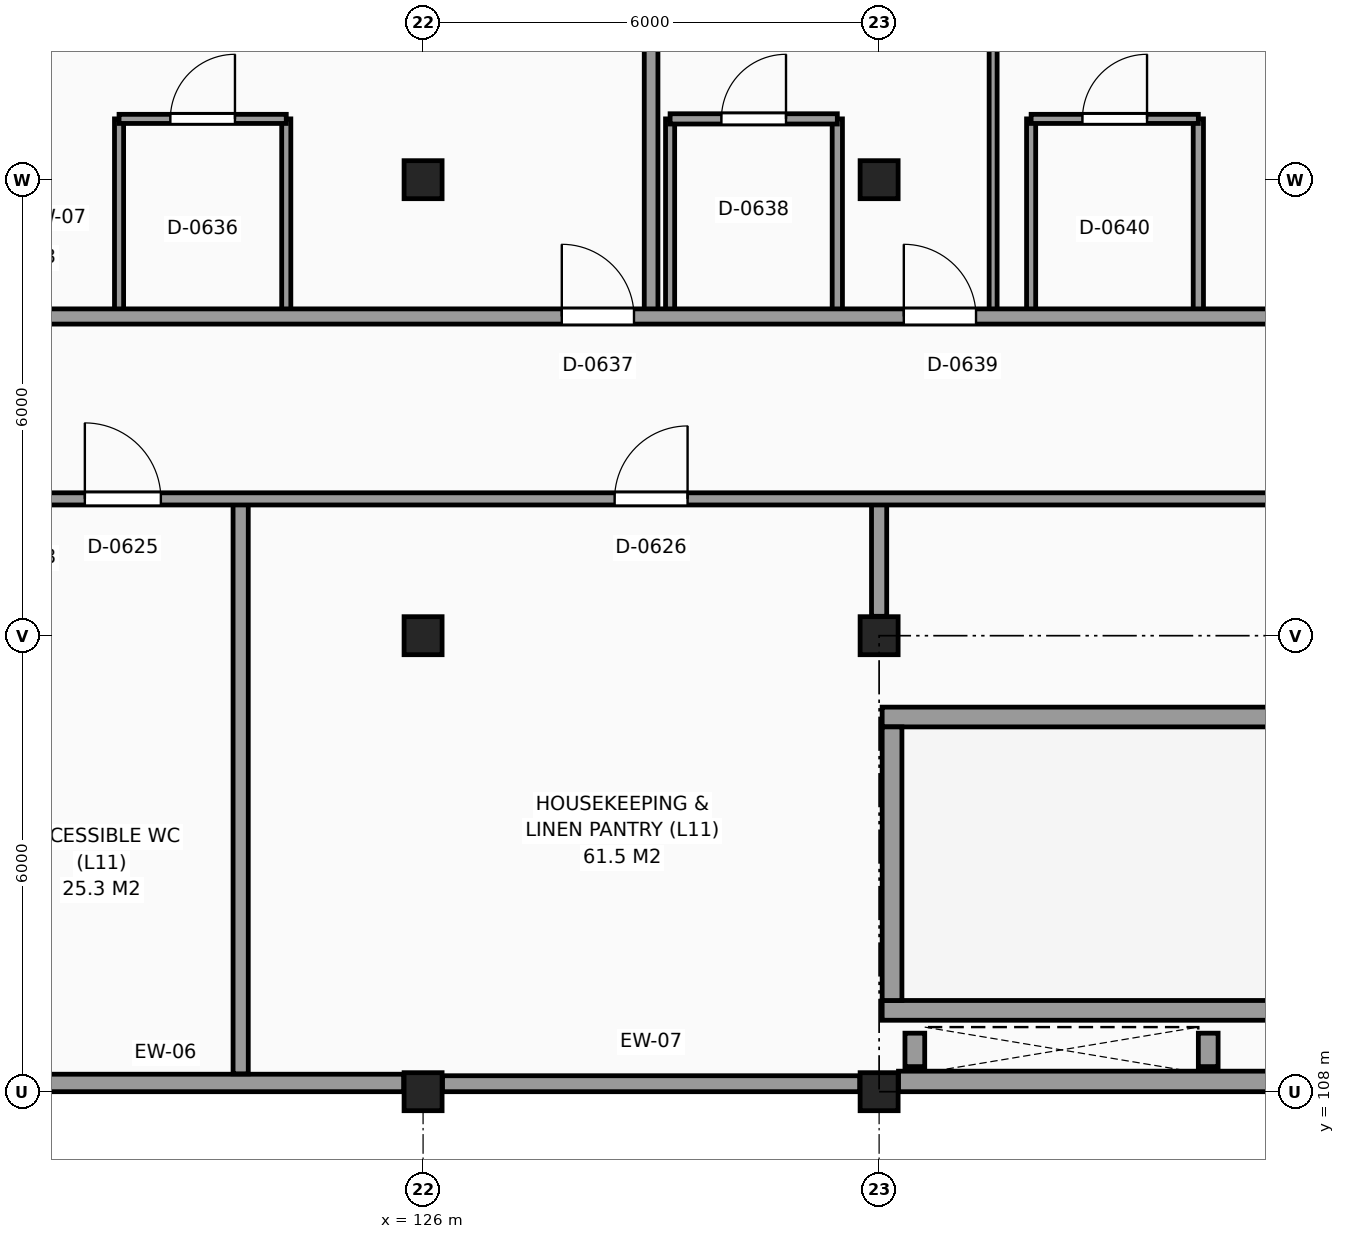
"""IFC4 building model, lengths in metres.
Left out: names, types, materials, properties, quantities, classifications, styles, units other than length and angle.
Written with IfcOpenShell. Run it as: python <this file> out.ifc"""

import sys

from ifc_helpers import new_model, si_unit, direction, frame, frame_2d, origin, origin_2d, place, context, subcontext, project, spatial, rectangle, extrude, element, fill, save


model = new_model("IFC4")
c1 = context("Model", 3, precision=1e-05, world=origin(), true_north=direction((0.0, 1.0)))
c2 = subcontext(c1, "Body", "Model", "MODEL_VIEW")
j1 = project(units=[si_unit("LENGTHUNIT", "METRE"), si_unit("PLANEANGLEUNIT", "RADIAN")], contexts=[c1])
p1 = place(None, origin())
s1 = spatial("IfcSite", under=j1, at=p1, CompositionType="ELEMENT")
p2 = place(p1, origin())
s2 = spatial("IfcBuilding", under=s1, at=p2, CompositionType="ELEMENT")
p3 = place(p2, frame((0.0, 0.0, 44.7)))
s3 = spatial("IfcBuildingStorey", under=s2, at=p3, CompositionType="ELEMENT", Elevation=44.7)
for number, where, z_axis, x_axis in (
    (1, (126.0, 108.0, 0.0), (0.0, 0.0, 1.0), (1.0, 0.0, 0.0)),
    (2, (126.0, 114.0, 0.0), (0.0, 0.0, 1.0), (1.0, 0.0, 0.0)),
    (3, (126.0, 120.0, 0.0), (0.0, 0.0, 1.0), (1.0, 0.0, 0.0)),
    (4, (132.0, 108.0, 0.0), (0.0, 0.0, 1.0), (1.0, 0.0, 0.0)),
    (5, (132.0, 114.0, 0.0), (0.0, 0.0, 1.0), (1.0, 0.0, 0.0)),
    (6, (132.0, 120.0, 0.0), (0.0, 0.0, 1.0), (1.0, 0.0, 0.0)),
):
    element("IfcColumn", number, at=place(p3, frame(where, z_axis=z_axis, x_axis=x_axis)), inside=s3, PredefinedType="COLUMN", context=c2, shape_type="SweptSolid", body=[
        extrude(rectangle(XDim=0.5, YDim=0.5, at=origin_2d()), origin(), (0.0, 0.0, 1.0), 3.3),
    ])
p4 = place(p3, frame((120.255, 108.115, 0.0), z_axis=(0.0, 0.0, 1.0), x_axis=(1.0, 0.0, 0.0)))
e7 = element("IfcWall", 7, at=p4, inside=s3, PredefinedType="SOLIDWALL", context=c2, shape_type="SweptSolid", body=[
    extrude(rectangle(XDim=5.49, YDim=0.23, at=frame_2d((2.745, 0.0))), origin(), (0.0, 0.0, 1.0), 2.4),
])
p5 = place(p3, frame((126.255, 108.105, 0.0), z_axis=(0.0, 0.0, 1.0), x_axis=(1.0, 0.0, 0.0)))
e8 = element("IfcWall", 8, at=p5, inside=s3, PredefinedType="SOLIDWALL", context=c2, shape_type="SweptSolid", body=[
    extrude(rectangle(XDim=5.49, YDim=0.21, at=frame_2d((2.745, 0.0))), origin(), (0.0, 0.0, 1.0), 2.4),
])
p6 = place(p3, frame((132.255, 108.135, 0.0), z_axis=(0.0, 0.0, 1.0), x_axis=(1.0, 0.0, 0.0)))
e9 = element("IfcWall", 9, at=p6, inside=s3, PredefinedType="SOLIDWALL", context=c2, shape_type="SweptSolid", body=[
    extrude(rectangle(XDim=5.49, YDim=0.27, at=frame_2d((2.745, 0.0))), origin(), (0.0, 0.0, 1.0), 3.05),
])
for number, where, z_axis, x_axis in (
    (10, (132.04, 109.07, 0.0), (0.0, 0.0, 1.0), (1.0, 0.0, 0.0)),
    (11, (132.04, 112.93, 0.0), (0.0, 0.0, 1.0), (1.0, 0.0, 0.0)),
):
    element("IfcWall", number, at=place(p3, frame(where, z_axis=z_axis, x_axis=x_axis)), inside=s3, PredefinedType="SHEAR", context=c2, shape_type="SweptSolid", body=[
        extrude(rectangle(XDim=10.72, YDim=0.26, at=frame_2d((5.36, 0.0))), origin(), (0.0, 0.0, 1.0), 3.3),
    ])
p7 = place(p3, frame((132.17, 109.2, 0.0), z_axis=(0.0, 0.0, 1.0), x_axis=(0.0, 1.0, 0.0)))
e12 = element("IfcWall", 12, at=p7, inside=s3, PredefinedType="SHEAR", context=c2, shape_type="SweptSolid", body=[
    extrude(rectangle(XDim=3.6, YDim=0.26, at=frame_2d((1.8, 0.0))), origin(), (0.0, 0.0, 1.0), 3.3),
])
for number, where, z_axis, x_axis in (
    (13, (132.47, 108.33, 0.0), (0.0, 0.0, 1.0), (0.0, 1.0, 0.0)),
    (14, (136.33, 108.33, 0.0), (0.0, 0.0, 1.0), (0.0, 1.0, 0.0)),
):
    element("IfcWall", number, at=place(p3, frame(where, z_axis=z_axis, x_axis=x_axis)), inside=s3, PredefinedType="SHEAR", context=c2, shape_type="SweptSolid", body=[
        extrude(rectangle(XDim=0.44, YDim=0.26, at=frame_2d((0.22, 0.0))), origin(), (0.0, 0.0, 1.0), 3.3),
    ])
p8 = place(p3, frame((122.0, 118.2, 0.0), z_axis=(0.0, 0.0, 1.0), x_axis=(0.0, 1.0, 0.0)))
e15 = element("IfcWall", 15, at=p8, inside=s3, PredefinedType="PARTITIONING", context=c2, shape_type="SweptSolid", body=[
    extrude(rectangle(XDim=2.6, YDim=0.12, at=frame_2d((1.3, 0.0))), origin(), (0.0, 0.0, 1.0), 3.05),
])
p9 = place(p3, frame((123.6, 108.235, 0.0), z_axis=(0.0, 0.0, 1.0), x_axis=(0.0, 1.0, 0.0)))
e16 = element("IfcWall", 16, at=p9, inside=s3, PredefinedType="PARTITIONING", context=c2, shape_type="SweptSolid", body=[
    extrude(rectangle(XDim=7.565, YDim=0.2, at=frame_2d((3.782, 0.0))), origin(), (0.0, 0.0, 1.0), 3.05),
])
p10 = place(p3, frame((124.2, 118.2, 0.0), z_axis=(0.0, 0.0, 1.0), x_axis=(0.0, 1.0, 0.0)))
e17 = element("IfcWall", 17, at=p10, inside=s3, PredefinedType="PARTITIONING", context=c2, shape_type="SweptSolid", body=[
    extrude(rectangle(XDim=2.6, YDim=0.12, at=frame_2d((1.3, 0.0))), origin(), (0.0, 0.0, 1.0), 3.05),
])
p11 = place(p3, frame((129.0, 118.2, 0.0), z_axis=(0.0, 0.0, 1.0), x_axis=(0.0, 1.0, 0.0)))
e18 = element("IfcWall", 18, at=p11, inside=s3, PredefinedType="PARTITIONING", context=c2, shape_type="SweptSolid", body=[
    extrude(rectangle(XDim=7.585, YDim=0.18, at=frame_2d((3.792, 0.0))), origin(), (0.0, 0.0, 1.0), 3.05),
])
p12 = place(p3, frame((129.25, 118.2, 0.0), z_axis=(0.0, 0.0, 1.0), x_axis=(0.0, 1.0, 0.0)))
e19 = element("IfcWall", 19, at=p12, inside=s3, PredefinedType="PARTITIONING", context=c2, shape_type="SweptSolid", body=[
    extrude(rectangle(XDim=2.6, YDim=0.12, at=frame_2d((1.3, 0.0))), origin(), (0.0, 0.0, 1.0), 3.05),
])
p13 = place(p3, frame((131.45, 118.2, 0.0), z_axis=(0.0, 0.0, 1.0), x_axis=(0.0, 1.0, 0.0)))
e20 = element("IfcWall", 20, at=p13, inside=s3, PredefinedType="PARTITIONING", context=c2, shape_type="SweptSolid", body=[
    extrude(rectangle(XDim=2.6, YDim=0.135, at=frame_2d((1.3, 0.0))), origin(), (0.0, 0.0, 1.0), 3.05),
])
p14 = place(p3, frame((132.0, 114.255, 0.0), z_axis=(0.0, 0.0, 1.0), x_axis=(0.0, 1.0, 0.0)))
e21 = element("IfcWall", 21, at=p14, inside=s3, PredefinedType="PARTITIONING", context=c2, shape_type="SweptSolid", body=[
    extrude(rectangle(XDim=1.545, YDim=0.2, at=frame_2d((0.772, 0.0))), origin(), (0.0, 0.0, 1.0), 2.25),
])
p15 = place(p3, frame((133.5, 118.2, 0.0), z_axis=(0.0, 0.0, 1.0), x_axis=(0.0, 1.0, 0.0)))
e22 = element("IfcWall", 22, at=p15, inside=s3, PredefinedType="PARTITIONING", context=c2, shape_type="SweptSolid", body=[
    extrude(rectangle(XDim=7.565, YDim=0.105, at=frame_2d((3.782, 0.0))), origin(), (0.0, 0.0, 1.0), 3.05),
])
p16 = place(p3, frame((134.0, 118.2, 0.0), z_axis=(0.0, 0.0, 1.0), x_axis=(0.0, 1.0, 0.0)))
e23 = element("IfcWall", 23, at=p16, inside=s3, PredefinedType="PARTITIONING", context=c2, shape_type="SweptSolid", body=[
    extrude(rectangle(XDim=2.6, YDim=0.12, at=frame_2d((1.3, 0.0))), origin(), (0.0, 0.0, 1.0), 3.05),
])
p17 = place(p3, frame((136.2, 118.2, 0.0), z_axis=(0.0, 0.0, 1.0), x_axis=(0.0, 1.0, 0.0)))
e24 = element("IfcWall", 24, at=p17, inside=s3, PredefinedType="PARTITIONING", context=c2, shape_type="SweptSolid", body=[
    extrude(rectangle(XDim=2.6, YDim=0.135, at=frame_2d((1.3, 0.0))), origin(), (0.0, 0.0, 1.0), 3.05),
])
p18 = place(p3, frame((102.255, 115.8, 0.0), z_axis=(0.0, 0.0, 1.0), x_axis=(1.0, 0.0, 0.0)))
e25 = element("IfcWall", 25, at=p18, inside=s3, PredefinedType="PARTITIONING", context=c2, shape_type="SweptSolid", body=[
    extrude(rectangle(XDim=67.545, YDim=0.16, at=frame_2d((33.772, 0.0))), origin(), (0.0, 0.0, 1.0), 3.05),
])
p19 = place(p18, frame((44.145, 0.0, 0.0)))
e26 = element("IfcOpeningElement", 26, at=p19, cuts=e25, PredefinedType="OPENING", context=c2, shape_type="SweptSolid", body=[
    extrude(rectangle(XDim=1.2, YDim=2.2, at=frame_2d((0.6, 1.1))), frame((0.0, 0.09, 0.0), z_axis=(0.0, -1.0, 0.0), x_axis=(1.0, 0.0, 0.0)), (0.0, 0.0, 1.0), 0.18),
])
p20 = place(p18, frame((14.145, 0.0, 0.0)))
e27 = element("IfcOpeningElement", 27, at=p20, cuts=e25, PredefinedType="OPENING", context=c2, shape_type="SweptSolid", body=[
    extrude(rectangle(XDim=1.2, YDim=2.2, at=frame_2d((0.6, 1.1))), frame((0.0, 0.09, 0.0), z_axis=(0.0, -1.0, 0.0), x_axis=(1.0, 0.0, 0.0)), (0.0, 0.0, 1.0), 0.18),
])
p21 = place(p18, frame((19.295, 0.0, 0.0)))
e28 = element("IfcOpeningElement", 28, at=p21, cuts=e25, PredefinedType="OPENING", context=c2, shape_type="SweptSolid", body=[
    extrude(rectangle(XDim=1.0, YDim=2.15, at=frame_2d((0.5, 1.075))), frame((0.0, 0.09, 0.0), z_axis=(0.0, -1.0, 0.0), x_axis=(1.0, 0.0, 0.0)), (0.0, 0.0, 1.0), 0.18),
])
p22 = place(p18, frame((26.265, 0.0, 0.0)))
e29 = element("IfcOpeningElement", 29, at=p22, cuts=e25, PredefinedType="OPENING", context=c2, shape_type="SweptSolid", body=[
    extrude(rectangle(XDim=0.96, YDim=2.15, at=frame_2d((0.48, 1.075))), frame((0.0, 0.09, 0.0), z_axis=(0.0, -1.0, 0.0), x_axis=(1.0, 0.0, 0.0)), (0.0, 0.0, 1.0), 0.18),
])
p23 = place(p18, frame((48.47, 0.0, 0.0)))
e30 = element("IfcOpeningElement", 30, at=p23, cuts=e25, PredefinedType="OPENING", context=c2, shape_type="SweptSolid", body=[
    extrude(rectangle(XDim=0.95, YDim=2.1, at=frame_2d((0.475, 1.05))), frame((0.0, 0.09, 0.0), z_axis=(0.0, -1.0, 0.0), x_axis=(1.0, 0.0, 0.0)), (0.0, 0.0, 1.0), 0.18),
])
p24 = place(p3, frame((102.255, 118.2, 0.0), z_axis=(0.0, 0.0, 1.0), x_axis=(1.0, 0.0, 0.0)))
e31 = element("IfcWall", 31, at=p24, inside=s3, PredefinedType="PARTITIONING", context=c2, shape_type="SweptSolid", body=[
    extrude(rectangle(XDim=74.245, YDim=0.2, at=frame_2d((37.123, 0.0))), origin(), (0.0, 0.0, 1.0), 3.05),
])
p25 = place(p24, frame((0.47, 0.0, 0.0)))
e32 = element("IfcOpeningElement", 32, at=p25, cuts=e31, PredefinedType="OPENING", context=c2, shape_type="SweptSolid", body=[
    extrude(rectangle(XDim=0.95, YDim=2.1, at=frame_2d((0.475, 1.05))), frame((0.0, 0.11, 0.0), z_axis=(0.0, -1.0, 0.0), x_axis=(1.0, 0.0, 0.0)), (0.0, 0.0, 1.0), 0.22),
])
p26 = place(p24, frame((4.87, 0.0, 0.0)))
e33 = element("IfcOpeningElement", 33, at=p26, cuts=e31, PredefinedType="OPENING", context=c2, shape_type="SweptSolid", body=[
    extrude(rectangle(XDim=0.95, YDim=2.1, at=frame_2d((0.475, 1.05))), frame((0.0, 0.11, 0.0), z_axis=(0.0, -1.0, 0.0), x_axis=(1.0, 0.0, 0.0)), (0.0, 0.0, 1.0), 0.22),
])
p27 = place(p24, frame((12.07, 0.0, 0.0)))
e34 = element("IfcOpeningElement", 34, at=p27, cuts=e31, PredefinedType="OPENING", context=c2, shape_type="SweptSolid", body=[
    extrude(rectangle(XDim=0.95, YDim=2.1, at=frame_2d((0.475, 1.05))), frame((0.0, 0.11, 0.0), z_axis=(0.0, -1.0, 0.0), x_axis=(1.0, 0.0, 0.0)), (0.0, 0.0, 1.0), 0.22),
])
p28 = place(p24, frame((16.27, 0.0, 0.0)))
e35 = element("IfcOpeningElement", 35, at=p28, cuts=e31, PredefinedType="OPENING", context=c2, shape_type="SweptSolid", body=[
    extrude(rectangle(XDim=0.95, YDim=2.1, at=frame_2d((0.475, 1.05))), frame((0.0, 0.11, 0.0), z_axis=(0.0, -1.0, 0.0), x_axis=(1.0, 0.0, 0.0)), (0.0, 0.0, 1.0), 0.22),
])
p29 = place(p24, frame((25.57, 0.0, 0.0)))
e36 = element("IfcOpeningElement", 36, at=p29, cuts=e31, PredefinedType="OPENING", context=c2, shape_type="SweptSolid", body=[
    extrude(rectangle(XDim=0.95, YDim=2.1, at=frame_2d((0.475, 1.05))), frame((0.0, 0.11, 0.0), z_axis=(0.0, -1.0, 0.0), x_axis=(1.0, 0.0, 0.0)), (0.0, 0.0, 1.0), 0.22),
])
p30 = place(p24, frame((30.07, 0.0, 0.0)))
e37 = element("IfcOpeningElement", 37, at=p30, cuts=e31, PredefinedType="OPENING", context=c2, shape_type="SweptSolid", body=[
    extrude(rectangle(XDim=0.95, YDim=2.1, at=frame_2d((0.475, 1.05))), frame((0.0, 0.11, 0.0), z_axis=(0.0, -1.0, 0.0), x_axis=(1.0, 0.0, 0.0)), (0.0, 0.0, 1.0), 0.22),
])
p31 = place(p24, frame((38.32, 0.0, 0.0)))
e38 = element("IfcOpeningElement", 38, at=p31, cuts=e31, PredefinedType="OPENING", context=c2, shape_type="SweptSolid", body=[
    extrude(rectangle(XDim=0.95, YDim=2.1, at=frame_2d((0.475, 1.05))), frame((0.0, 0.11, 0.0), z_axis=(0.0, -1.0, 0.0), x_axis=(1.0, 0.0, 0.0)), (0.0, 0.0, 1.0), 0.22),
])
p32 = place(p24, frame((46.27, 0.0, 0.0)))
e39 = element("IfcOpeningElement", 39, at=p32, cuts=e31, PredefinedType="OPENING", context=c2, shape_type="SweptSolid", body=[
    extrude(rectangle(XDim=0.95, YDim=2.1, at=frame_2d((0.475, 1.05))), frame((0.0, 0.11, 0.0), z_axis=(0.0, -1.0, 0.0), x_axis=(1.0, 0.0, 0.0)), (0.0, 0.0, 1.0), 0.22),
])
p33 = place(p24, frame((48.47, 0.0, 0.0)))
e40 = element("IfcOpeningElement", 40, at=p33, cuts=e31, PredefinedType="OPENING", context=c2, shape_type="SweptSolid", body=[
    extrude(rectangle(XDim=0.95, YDim=2.1, at=frame_2d((0.475, 1.05))), frame((0.0, 0.11, 0.0), z_axis=(0.0, -1.0, 0.0), x_axis=(1.0, 0.0, 0.0)), (0.0, 0.0, 1.0), 0.22),
])
p34 = place(p24, frame((54.47, 0.0, 0.0)))
e41 = element("IfcOpeningElement", 41, at=p34, cuts=e31, PredefinedType="OPENING", context=c2, shape_type="SweptSolid", body=[
    extrude(rectangle(XDim=0.95, YDim=2.1, at=frame_2d((0.475, 1.05))), frame((0.0, 0.11, 0.0), z_axis=(0.0, -1.0, 0.0), x_axis=(1.0, 0.0, 0.0)), (0.0, 0.0, 1.0), 0.22),
])
p35 = place(p24, frame((64.27, 0.0, 0.0)))
e42 = element("IfcOpeningElement", 42, at=p35, cuts=e31, PredefinedType="OPENING", context=c2, shape_type="SweptSolid", body=[
    extrude(rectangle(XDim=0.95, YDim=2.1, at=frame_2d((0.475, 1.05))), frame((0.0, 0.11, 0.0), z_axis=(0.0, -1.0, 0.0), x_axis=(1.0, 0.0, 0.0)), (0.0, 0.0, 1.0), 0.22),
])
p36 = place(p24, frame((68.22, 0.0, 0.0)))
e43 = element("IfcOpeningElement", 43, at=p36, cuts=e31, PredefinedType="OPENING", context=c2, shape_type="SweptSolid", body=[
    extrude(rectangle(XDim=0.95, YDim=2.1, at=frame_2d((0.475, 1.05))), frame((0.0, 0.11, 0.0), z_axis=(0.0, -1.0, 0.0), x_axis=(1.0, 0.0, 0.0)), (0.0, 0.0, 1.0), 0.22),
])
p37 = place(p3, frame((122.0, 120.8, 0.0), z_axis=(0.0, 0.0, 1.0), x_axis=(1.0, 0.0, 0.0)))
e44 = element("IfcWall", 44, at=p37, inside=s3, PredefinedType="PARTITIONING", context=c2, shape_type="SweptSolid", body=[
    extrude(rectangle(XDim=2.2, YDim=0.12, at=frame_2d((1.1, 0.0))), origin(), (0.0, 0.0, 1.0), 3.05),
])
p38 = place(p37, frame((0.675, 0.0, 0.0)))
e45 = element("IfcOpeningElement", 45, at=p38, cuts=e44, PredefinedType="OPENING", context=c2, shape_type="SweptSolid", body=[
    extrude(rectangle(XDim=0.85, YDim=2.1, at=frame_2d((0.425, 1.05))), frame((0.0, 0.07, 0.0), z_axis=(0.0, -1.0, 0.0), x_axis=(1.0, 0.0, 0.0)), (0.0, 0.0, 1.0), 0.14),
])
p39 = place(p3, frame((129.25, 120.8, 0.0), z_axis=(0.0, 0.0, 1.0), x_axis=(1.0, 0.0, 0.0)))
e46 = element("IfcWall", 46, at=p39, inside=s3, PredefinedType="PARTITIONING", context=c2, shape_type="SweptSolid", body=[
    extrude(rectangle(XDim=2.2, YDim=0.135, at=frame_2d((1.1, 0.0))), origin(), (0.0, 0.0, 1.0), 3.05),
])
p40 = place(p39, frame((0.675, 0.0, 0.0)))
e47 = element("IfcOpeningElement", 47, at=p40, cuts=e46, PredefinedType="OPENING", context=c2, shape_type="SweptSolid", body=[
    extrude(rectangle(XDim=0.85, YDim=2.1, at=frame_2d((0.425, 1.05))), frame((0.0, 0.078, 0.0), z_axis=(0.0, -1.0, 0.0), x_axis=(1.0, 0.0, 0.0)), (0.0, 0.0, 1.0), 0.155),
])
p41 = place(p3, frame((134.0, 120.8, 0.0), z_axis=(0.0, 0.0, 1.0), x_axis=(1.0, 0.0, 0.0)))
e48 = element("IfcWall", 48, at=p41, inside=s3, PredefinedType="PARTITIONING", context=c2, shape_type="SweptSolid", body=[
    extrude(rectangle(XDim=2.2, YDim=0.12, at=frame_2d((1.1, 0.0))), origin(), (0.0, 0.0, 1.0), 3.05),
])
p42 = place(p41, frame((0.675, 0.0, 0.0)))
e49 = element("IfcOpeningElement", 49, at=p42, cuts=e48, PredefinedType="OPENING", context=c2, shape_type="SweptSolid", body=[
    extrude(rectangle(XDim=0.85, YDim=2.1, at=frame_2d((0.425, 1.05))), frame((0.0, 0.07, 0.0), z_axis=(0.0, -1.0, 0.0), x_axis=(1.0, 0.0, 0.0)), (0.0, 0.0, 1.0), 0.14),
])
p43 = place(p21, origin())
e50 = element("IfcDoor", 50, at=p43, inside=s3, OperationType="SINGLE_SWING_LEFT", PredefinedType="DOOR", context=c2, shape_type="SweptSolid", body=[
    extrude(rectangle(XDim=1.0, YDim=2.15, at=frame_2d((0.5, 1.075))), frame((0.0, 0.025, 0.0), z_axis=(0.0, -1.0, 0.0), x_axis=(1.0, 0.0, 0.0)), (0.0, 0.0, 1.0), 0.05),
])
fill(e28, e50)
p44 = place(p22, origin())
e51 = element("IfcDoor", 51, at=p44, inside=s3, OperationType="SINGLE_SWING_RIGHT", PredefinedType="DOOR", context=c2, shape_type="SweptSolid", body=[
    extrude(rectangle(XDim=0.96, YDim=2.15, at=frame_2d((0.48, 1.075))), frame((0.0, 0.025, 0.0), z_axis=(0.0, -1.0, 0.0), x_axis=(1.0, 0.0, 0.0)), (0.0, 0.0, 1.0), 0.05),
])
fill(e29, e51)
p45 = place(p38, origin())
e52 = element("IfcDoor", 52, at=p45, inside=s3, OperationType="SINGLE_SWING_RIGHT", PredefinedType="DOOR", context=c2, shape_type="SweptSolid", body=[
    extrude(rectangle(XDim=0.85, YDim=2.1, at=frame_2d((0.425, 1.05))), frame((0.0, 0.025, 0.0), z_axis=(0.0, -1.0, 0.0), x_axis=(1.0, 0.0, 0.0)), (0.0, 0.0, 1.0), 0.05),
])
fill(e45, e52)
p46 = place(p29, origin())
e53 = element("IfcDoor", 53, at=p46, inside=s3, OperationType="SINGLE_SWING_LEFT", PredefinedType="DOOR", context=c2, shape_type="SweptSolid", body=[
    extrude(rectangle(XDim=0.95, YDim=2.1, at=frame_2d((0.475, 1.05))), frame((0.0, 0.025, 0.0), z_axis=(0.0, -1.0, 0.0), x_axis=(1.0, 0.0, 0.0)), (0.0, 0.0, 1.0), 0.05),
])
fill(e36, e53)
p47 = place(p40, origin())
e54 = element("IfcDoor", 54, at=p47, inside=s3, OperationType="SINGLE_SWING_RIGHT", PredefinedType="DOOR", context=c2, shape_type="SweptSolid", body=[
    extrude(rectangle(XDim=0.85, YDim=2.1, at=frame_2d((0.425, 1.05))), frame((0.0, 0.025, 0.0), z_axis=(0.0, -1.0, 0.0), x_axis=(1.0, 0.0, 0.0)), (0.0, 0.0, 1.0), 0.05),
])
fill(e47, e54)
p48 = place(p30, origin())
e55 = element("IfcDoor", 55, at=p48, inside=s3, OperationType="SINGLE_SWING_LEFT", PredefinedType="DOOR", context=c2, shape_type="SweptSolid", body=[
    extrude(rectangle(XDim=0.95, YDim=2.1, at=frame_2d((0.475, 1.05))), frame((0.0, 0.025, 0.0), z_axis=(0.0, -1.0, 0.0), x_axis=(1.0, 0.0, 0.0)), (0.0, 0.0, 1.0), 0.05),
])
fill(e37, e55)
p49 = place(p42, origin())
e56 = element("IfcDoor", 56, at=p49, inside=s3, OperationType="SINGLE_SWING_RIGHT", PredefinedType="DOOR", context=c2, shape_type="SweptSolid", body=[
    extrude(rectangle(XDim=0.85, YDim=2.1, at=frame_2d((0.425, 1.05))), frame((0.0, 0.025, 0.0), z_axis=(0.0, -1.0, 0.0), x_axis=(1.0, 0.0, 0.0)), (0.0, 0.0, 1.0), 0.05),
])
fill(e49, e56)
save(model, sys.argv[1])
